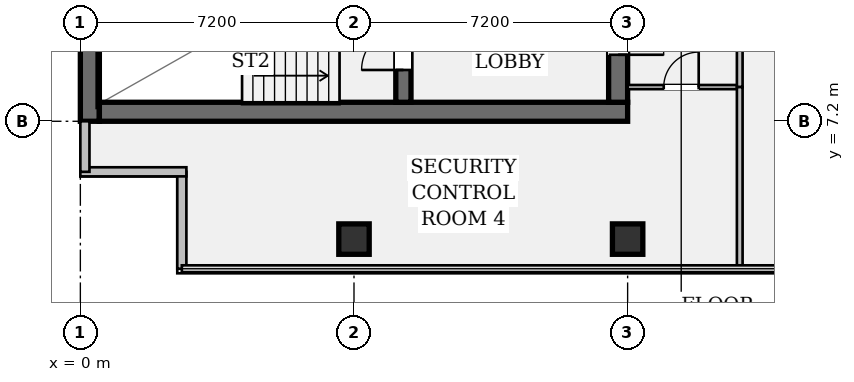
"""IFC4 building model, lengths in metres.
Left out: names, types, materials, properties, quantities, classifications, styles, units other than length and angle.
Written with IfcOpenShell. Run it as: python <this file> out.ifc"""

import sys

from ifc_helpers import new_model, si_unit, direction, frame, frame_2d, origin, origin_2d, place, context, subcontext, project, spatial, rectangle, hollow_rectangle, extrude, element, fill, save


model = new_model("IFC4")
c1 = context("Model", 3, precision=1e-05, world=origin(), true_north=direction((0.0, 1.0)))
c2 = subcontext(c1, "Body", "Model", "MODEL_VIEW")
j1 = project(units=[si_unit("LENGTHUNIT", "METRE"), si_unit("PLANEANGLEUNIT", "RADIAN")], contexts=[c1])
p1 = place(None, origin())
s1 = spatial("IfcSite", under=j1, at=p1, CompositionType="ELEMENT")
p2 = place(p1, origin())
s2 = spatial("IfcBuilding", under=s1, at=p2, CompositionType="ELEMENT")
p3 = place(p2, frame((0.0, 0.0, 187.25)))
s3 = spatial("IfcBuildingStorey", under=s2, at=p3, CompositionType="ELEMENT", Elevation=187.25)
p4 = place(p3, frame((0.25, 7.2, 0.0), z_axis=(0.0, 0.0, 1.0), x_axis=(0.0, 1.0, 0.0)))
e1 = element("IfcWall", 1, at=p4, inside=s3, PredefinedType="SHEAR", context=c2, shape_type="SweptSolid", body=[
    extrude(rectangle(XDim=28.8, YDim=0.5, at=frame_2d((14.4, 0.0))), origin(), (0.0, 0.0, 1.0), 3.24),
])
p5 = place(p3, frame((0.5, 7.45, 0.0), z_axis=(0.0, 0.0, 1.0), x_axis=(1.0, 0.0, 0.0)))
e2 = element("IfcWall", 2, at=p5, inside=s3, PredefinedType="SHEAR", context=c2, shape_type="SweptSolid", body=[
    extrude(rectangle(XDim=13.9, YDim=0.5, at=frame_2d((6.95, 0.0))), origin(), (0.0, 0.0, 1.0), 3.24),
])
p6 = place(p3, frame((14.15, 35.5, 0.0), z_axis=(0.0, 0.0, 1.0), x_axis=(0.0, -1.0, 0.0)))
e3 = element("IfcWall", 3, at=p6, inside=s3, PredefinedType="SHEAR", context=c2, shape_type="SweptSolid", body=[
    extrude(rectangle(XDim=27.8, YDim=0.5, at=frame_2d((13.9, 0.0))), origin(), (0.0, 0.0, 1.0), 3.24),
])
p7 = place(p6, frame((1.4, 0.0, 0.0)))
e4 = element("IfcOpeningElement", 4, at=p7, cuts=e3, PredefinedType="OPENING", context=c2, shape_type="SweptSolid", body=[
    extrude(rectangle(XDim=1.2, YDim=2.15, at=frame_2d((0.6, 1.075))), frame((0.0, 0.262, 0.0), z_axis=(0.0, -1.0, 0.0), x_axis=(1.0, 0.0, 0.0)), (0.0, 0.0, 1.0), 0.524),
])
p8 = place(p6, frame((25.35, 0.0, 0.0)))
e5 = element("IfcOpeningElement", 5, at=p8, cuts=e3, PredefinedType="OPENING", context=c2, shape_type="SweptSolid", body=[
    extrude(rectangle(XDim=1.2, YDim=2.15, at=frame_2d((0.6, 1.075))), frame((0.0, 0.262, 0.0), z_axis=(0.0, -1.0, 0.0), x_axis=(1.0, 0.0, 0.0)), (0.0, 0.0, 1.0), 0.524),
])
p9 = place(p6, frame((14.7, 0.0, 0.0)))
e6 = element("IfcOpeningElement", 6, at=p9, cuts=e3, PredefinedType="OPENING", context=c2, shape_type="SweptSolid", body=[
    extrude(rectangle(XDim=1.6, YDim=2.2, at=frame_2d((0.8, 1.1))), frame((0.0, 0.262, 0.0), z_axis=(0.0, -1.0, 0.0), x_axis=(1.0, 0.0, 0.0)), (0.0, 0.0, 1.0), 0.524),
])
p10 = place(p3, frame((8.5, 7.7, 0.0), z_axis=(0.0, 0.0, 1.0), x_axis=(0.0, 1.0, 0.0)))
e7 = element("IfcWall", 7, at=p10, inside=s3, PredefinedType="SHEAR", context=c2, shape_type="SweptSolid", body=[
    extrude(rectangle(XDim=3.78, YDim=0.4, at=frame_2d((1.89, 0.0))), origin(), (0.0, 0.0, 1.0), 3.24),
])
p11 = place(p10, frame((0.85, 0.0, 0.0)))
e8 = element("IfcOpeningElement", 8, at=p11, cuts=e7, PredefinedType="OPENING", context=c2, shape_type="SweptSolid", body=[
    extrude(rectangle(XDim=1.1, YDim=2.15, at=frame_2d((0.55, 1.075))), frame((0.0, 0.212, 0.0), z_axis=(0.0, -1.0, 0.0), x_axis=(1.0, 0.0, 0.0)), (0.0, 0.0, 1.0), 0.424),
])
for number, where, z_axis, x_axis in (
    (9, (7.2, 4.1, 0.0), (0.0, 0.0, 1.0), (1.0, 0.0, 0.0)),
    (10, (14.4, 4.1, 0.0), (0.0, 0.0, 1.0), (1.0, 0.0, 0.0)),
):
    element("IfcColumn", number, at=place(p3, frame(where, z_axis=z_axis, x_axis=x_axis)), inside=s3, PredefinedType="COLUMN", context=c2, shape_type="SweptSolid", body=[
        extrude(hollow_rectangle(XDim=0.8, YDim=0.8, WallThickness=0.05, at=origin_2d()), origin(), (0.0, 0.0, 1.0), 3.24),
    ])
p12 = place(p3, frame((2.67, 3.32, 0.0), z_axis=(0.0, 0.0, 1.0), x_axis=(0.0, 1.0, 0.0)))
e11 = element("IfcWall", 11, at=p12, inside=s3, PredefinedType="STANDARD", context=c2, shape_type="SweptSolid", body=[
    extrude(rectangle(XDim=2.55, YDim=0.24, at=frame_2d((1.275, 0.0))), origin(), (0.0, 0.0, 1.0), 3.24),
])
p13 = place(p3, frame((2.79, 5.87, 0.0), z_axis=(0.0, 0.0, 1.0), x_axis=(-1.0, 0.0, 0.0)))
e12 = element("IfcWall", 12, at=p13, inside=s3, PredefinedType="STANDARD", context=c2, shape_type="SweptSolid", body=[
    extrude(rectangle(XDim=2.79, YDim=0.24, at=frame_2d((1.395, 0.0))), origin(), (0.0, 0.0, 1.0), 3.24),
])
p14 = place(p3, frame((0.12, 5.87, 0.0), z_axis=(0.0, 0.0, 1.0), x_axis=(0.0, 1.0, 0.0)))
e13 = element("IfcWall", 13, at=p14, inside=s3, PredefinedType="STANDARD", context=c2, shape_type="SweptSolid", body=[
    extrude(rectangle(XDim=1.33, YDim=0.24, at=frame_2d((0.665, 0.0))), origin(), (0.0, 0.0, 1.0), 3.24),
])
p15 = place(p3, frame((14.4, 8.1, 0.0), z_axis=(0.0, 0.0, 1.0), x_axis=(1.0, 0.0, 0.0)))
e14 = element("IfcWall", 14, at=p15, inside=s3, PredefinedType="PARTITIONING", context=c2, shape_type="SweptSolid", body=[
    extrude(rectangle(XDim=2.95, YDim=0.11, at=frame_2d((1.475, 0.0))), origin(), (0.0, 0.0, 1.0), 2.808),
])
p16 = place(p15, frame((0.95, 0.0, 0.0)))
e15 = element("IfcOpeningElement", 15, at=p16, cuts=e14, PredefinedType="OPENING", context=c2, shape_type="SweptSolid", body=[
    extrude(rectangle(XDim=0.92, YDim=2.15, at=frame_2d((0.46, 1.075))), frame((0.0, 0.067, 0.0), z_axis=(0.0, -1.0, 0.0), x_axis=(1.0, 0.0, 0.0)), (0.0, 0.0, 1.0), 0.134),
])
p17 = place(p3, frame((17.35, 8.1, 0.0), z_axis=(0.0, 0.0, 1.0), x_axis=(0.0, 1.0, 0.0)))
e16 = element("IfcWall", 16, at=p17, inside=s3, PredefinedType="PARTITIONING", context=c2, shape_type="SweptSolid", body=[
    extrude(rectangle(XDim=10.2, YDim=0.15, at=frame_2d((5.1, 0.0))), origin(), (0.0, 0.0, 1.0), 2.603),
])
p18 = place(p3, frame((17.35, 3.32, 0.0), z_axis=(0.0, 0.0, 1.0), x_axis=(0.0, 1.0, 0.0)))
e17 = element("IfcWall", 17, at=p18, inside=s3, PredefinedType="PARTITIONING", context=c2, shape_type="SweptSolid", body=[
    extrude(rectangle(XDim=4.78, YDim=0.15, at=frame_2d((2.39, 0.0))), origin(), (0.0, 0.0, 1.0), 2.603),
])
p19 = place(p11, origin())
e18 = element("IfcDoor", 18, at=p19, inside=s3, OperationType="SINGLE_SWING_LEFT", PredefinedType="DOOR", context=c2, shape_type="SweptSolid", body=[
    extrude(rectangle(XDim=1.1, YDim=2.15, at=frame_2d((0.55, 1.075))), frame((0.0, 0.025, 0.0), z_axis=(0.0, -1.0, 0.0), x_axis=(1.0, 0.0, 0.0)), (0.0, 0.0, 1.0), 0.05),
])
fill(e8, e18)
p20 = place(p8, origin())
e19 = element("IfcDoor", 19, at=p20, inside=s3, OperationType="SINGLE_SWING_RIGHT", PredefinedType="DOOR", context=c2, shape_type="SweptSolid", body=[
    extrude(rectangle(XDim=1.2, YDim=2.15, at=frame_2d((0.6, 1.075))), frame((0.0, 0.025, 0.0), z_axis=(0.0, -1.0, 0.0), x_axis=(1.0, 0.0, 0.0)), (0.0, 0.0, 1.0), 0.05),
])
fill(e5, e19)
p21 = place(p16, origin())
e20 = element("IfcDoor", 20, at=p21, inside=s3, OperationType="SINGLE_SWING_RIGHT", PredefinedType="DOOR", context=c2, shape_type="SweptSolid", body=[
    extrude(rectangle(XDim=0.92, YDim=2.15, at=frame_2d((0.46, 1.075))), frame((0.0, 0.025, 0.0), z_axis=(0.0, -1.0, 0.0), x_axis=(1.0, 0.0, 0.0)), (0.0, 0.0, 1.0), 0.05),
])
fill(e15, e20)
save(model, sys.argv[1])
